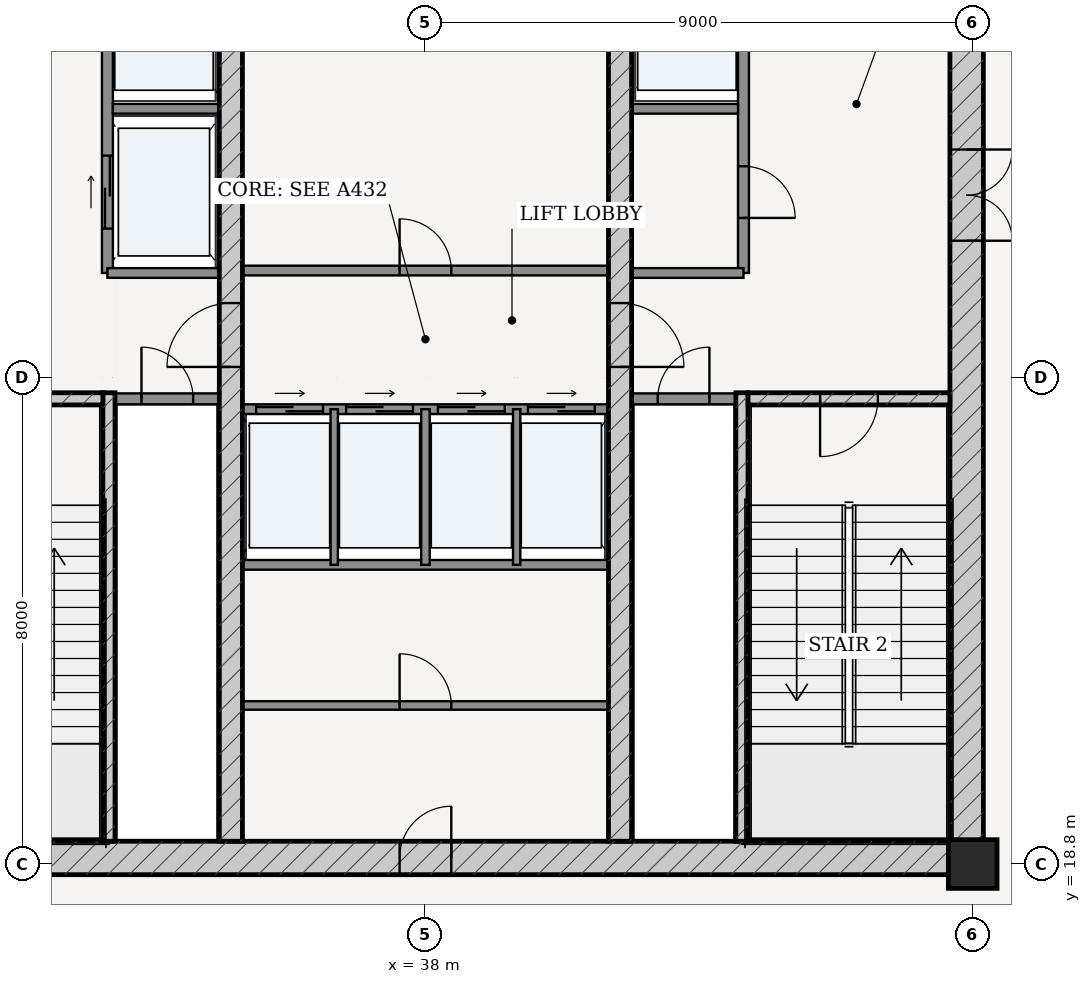
"""IFC4 building model, lengths in metres.
Left out: names, types, materials, properties, quantities, classifications, styles, units other than length and angle.
Written with IfcOpenShell. Run it as: python <this file> out.ifc"""

import sys

from ifc_helpers import new_model, si_unit, direction, frame, frame_2d, origin, origin_2d, place, context, subcontext, project, spatial, rectangle, extrude, source, transform, mapped, element, fill, save


model = new_model("IFC4")
c1 = context("Model", 3, precision=1e-05, world=origin(), true_north=direction((-0.2419218956, 0.970295726276)))
c2 = subcontext(c1, "Body", "Model", "MODEL_VIEW")
j1 = project(units=[si_unit("LENGTHUNIT", "METRE"), si_unit("PLANEANGLEUNIT", "RADIAN")], contexts=[c1])
p1 = place(None, origin())
s1 = spatial("IfcSite", under=j1, at=p1, CompositionType="ELEMENT")
p2 = place(p1, origin())
s2 = spatial("IfcBuilding", under=s1, at=p2, CompositionType="ELEMENT")
p3 = place(p2, frame((0.0, 0.0, 243.0)))
s3 = spatial("IfcBuildingStorey", under=s2, at=p3, CompositionType="ELEMENT", Elevation=243.0)
p4 = place(p3, frame((47.0, 18.8, 0.0), z_axis=(0.0, 0.0, 1.0), x_axis=(1.0, 0.0, 0.0)))
e1 = element("IfcColumn", 1, at=p4, inside=s3, PredefinedType="COLUMN", context=c2, shape_type="SweptSolid", body=[
    extrude(rectangle(XDim=0.8, YDim=0.8, at=origin_2d()), origin(), (0.0, 0.0, 1.0), 5.2),
])
p5 = place(p3, frame((28.825, 18.9, 0.0), z_axis=(0.0, 0.0, 1.0), x_axis=(1.0, 0.0, 0.0)))
e2 = element("IfcWall", 2, at=p5, inside=s3, PredefinedType="SHEAR", context=c2, shape_type="SweptSolid", body=[
    extrude(rectangle(XDim=18.35, YDim=0.55, at=frame_2d((9.175, 0.0))), origin(), (0.0, 0.0, 1.0), 4.94),
])
p6 = place(p5, frame((8.75, 0.0, 0.0)))
e3 = element("IfcOpeningElement", 3, at=p6, cuts=e2, PredefinedType="OPENING", context=c2, shape_type="SweptSolid", body=[
    extrude(rectangle(XDim=0.85, YDim=2.1, at=frame_2d((0.425, 1.05))), frame((0.0, 0.285, 0.0), z_axis=(0.0, -1.0, 0.0), x_axis=(1.0, 0.0, 0.0)), (0.0, 0.0, 1.0), 0.57),
])
p7 = place(p3, frame((46.9, 19.175, 0.0), z_axis=(0.0, 0.0, 1.0), x_axis=(0.0, 1.0, 0.0)))
e4 = element("IfcWall", 4, at=p7, inside=s3, PredefinedType="SHEAR", context=c2, shape_type="SweptSolid", body=[
    extrude(rectangle(XDim=15.25, YDim=0.55, at=frame_2d((7.625, 0.0))), origin(), (0.0, 0.0, 1.0), 4.94),
])
p8 = place(p7, frame((9.875, 0.0, 0.0)))
e5 = element("IfcOpeningElement", 5, at=p8, cuts=e4, PredefinedType="OPENING", context=c2, shape_type="SweptSolid", body=[
    extrude(rectangle(XDim=1.5, YDim=2.2, at=frame_2d((0.75, 1.1))), frame((0.0, 0.285, 0.0), z_axis=(0.0, -1.0, 0.0), x_axis=(1.0, 0.0, 0.0)), (0.0, 0.0, 1.0), 0.57),
])
p9 = place(p3, frame((32.795, 19.175, 0.0), z_axis=(0.0, 0.0, 1.0), x_axis=(0.0, 1.0, 0.0)))
e6 = element("IfcWall", 6, at=p9, inside=s3, PredefinedType="SOLIDWALL", context=c2, shape_type="SweptSolid", body=[
    extrude(rectangle(XDim=7.375, YDim=0.2, at=frame_2d((3.688, 0.0))), origin(), (0.0, 0.0, 1.0), 4.94),
])
p10 = place(p3, frame((29.375, 26.45, 0.0), z_axis=(0.0, 0.0, 1.0), x_axis=(1.0, 0.0, 0.0)))
e7 = element("IfcWall", 7, at=p10, inside=s3, PredefinedType="SOLIDWALL", context=c2, shape_type="SweptSolid", body=[
    extrude(rectangle(XDim=3.32, YDim=0.2, at=frame_2d((1.66, 0.0))), origin(), (0.0, 0.0, 1.0), 4.94),
])
p11 = place(p10, frame((1.185, 0.0, 0.0)))
e8 = element("IfcOpeningElement", 8, at=p11, cuts=e7, PredefinedType="OPENING", context=c2, shape_type="SweptSolid", body=[
    extrude(rectangle(XDim=0.95, YDim=2.15, at=frame_2d((0.475, 1.075))), frame((0.0, 0.11, 0.0), z_axis=(0.0, -1.0, 0.0), x_axis=(1.0, 0.0, 0.0)), (0.0, 0.0, 1.0), 0.22),
])
p12 = place(p3, frame((43.205, 19.175, 0.0), z_axis=(0.0, 0.0, 1.0), x_axis=(0.0, 1.0, 0.0)))
e9 = element("IfcWall", 9, at=p12, inside=s3, PredefinedType="SOLIDWALL", context=c2, shape_type="SweptSolid", body=[
    extrude(rectangle(XDim=7.375, YDim=0.2, at=frame_2d((3.688, 0.0))), origin(), (0.0, 0.0, 1.0), 4.94),
])
p13 = place(p3, frame((43.305, 26.45, 0.0), z_axis=(0.0, 0.0, 1.0), x_axis=(1.0, 0.0, 0.0)))
e10 = element("IfcWall", 10, at=p13, inside=s3, PredefinedType="SOLIDWALL", context=c2, shape_type="SweptSolid", body=[
    extrude(rectangle(XDim=3.32, YDim=0.2, at=frame_2d((1.66, 0.0))), origin(), (0.0, 0.0, 1.0), 4.94),
])
p14 = place(p13, frame((1.185, 0.0, 0.0)))
e11 = element("IfcOpeningElement", 11, at=p14, cuts=e10, PredefinedType="OPENING", context=c2, shape_type="SweptSolid", body=[
    extrude(rectangle(XDim=0.95, YDim=2.15, at=frame_2d((0.475, 1.075))), frame((0.0, 0.11, 0.0), z_axis=(0.0, -1.0, 0.0), x_axis=(1.0, 0.0, 0.0)), (0.0, 0.0, 1.0), 0.22),
])
p15 = place(p3, frame((34.8, 19.175, 0.0), z_axis=(0.0, 0.0, 1.0), x_axis=(0.0, 1.0, 0.0)))
e12 = element("IfcWall", 12, at=p15, inside=s3, PredefinedType="SHEAR", context=c2, shape_type="SweptSolid", body=[
    extrude(rectangle(XDim=15.25, YDim=0.38, at=frame_2d((7.625, 0.0))), origin(), (0.0, 0.0, 1.0), 4.94),
])
p16 = place(p15, frame((7.8, 0.0, 0.0)))
e13 = element("IfcOpeningElement", 13, at=p16, cuts=e12, PredefinedType="OPENING", context=c2, shape_type="SweptSolid", body=[
    extrude(rectangle(XDim=1.05, YDim=2.15, at=frame_2d((0.525, 1.075))), frame((0.0, 0.2, 0.0), z_axis=(0.0, -1.0, 0.0), x_axis=(1.0, 0.0, 0.0)), (0.0, 0.0, 1.0), 0.4),
])
p17 = place(p3, frame((41.2, 19.175, 0.0), z_axis=(0.0, 0.0, 1.0), x_axis=(0.0, 1.0, 0.0)))
e14 = element("IfcWall", 14, at=p17, inside=s3, PredefinedType="SHEAR", context=c2, shape_type="SweptSolid", body=[
    extrude(rectangle(XDim=15.25, YDim=0.38, at=frame_2d((7.625, 0.0))), origin(), (0.0, 0.0, 1.0), 4.94),
])
p18 = place(p17, frame((7.8, 0.0, 0.0)))
e15 = element("IfcOpeningElement", 15, at=p18, cuts=e14, PredefinedType="OPENING", context=c2, shape_type="SweptSolid", body=[
    extrude(rectangle(XDim=1.05, YDim=2.15, at=frame_2d((0.525, 1.075))), frame((0.0, 0.2, 0.0), z_axis=(0.0, -1.0, 0.0), x_axis=(1.0, 0.0, 0.0)), (0.0, 0.0, 1.0), 0.4),
])
p19 = place(p3, frame((32.9, 26.45, 0.0), z_axis=(0.0, 0.0, 1.0), x_axis=(1.0, 0.0, 0.0)))
e16 = element("IfcWall", 16, at=p19, inside=s3, PredefinedType="PARTITIONING", context=c2, shape_type="SweptSolid", body=[
    extrude(rectangle(XDim=1.71, YDim=0.18, at=frame_2d((0.855, 0.0))), origin(), (0.0, 0.0, 1.0), 4.94),
])
p20 = place(p19, frame((0.43, 0.0, 0.0)))
e17 = element("IfcOpeningElement", 17, at=p20, cuts=e16, PredefinedType="OPENING", context=c2, shape_type="SweptSolid", body=[
    extrude(rectangle(XDim=0.85, YDim=2.1, at=frame_2d((0.425, 1.05))), frame((0.0, 0.1, 0.0), z_axis=(0.0, -1.0, 0.0), x_axis=(1.0, 0.0, 0.0)), (0.0, 0.0, 1.0), 0.2),
])
p21 = place(p3, frame((41.39, 26.45, 0.0), z_axis=(0.0, 0.0, 1.0), x_axis=(1.0, 0.0, 0.0)))
e18 = element("IfcWall", 18, at=p21, inside=s3, PredefinedType="PARTITIONING", context=c2, shape_type="SweptSolid", body=[
    extrude(rectangle(XDim=1.71, YDim=0.18, at=frame_2d((0.855, 0.0))), origin(), (0.0, 0.0, 1.0), 4.94),
])
p22 = place(p21, frame((0.43, 0.0, 0.0)))
e19 = element("IfcOpeningElement", 19, at=p22, cuts=e18, PredefinedType="OPENING", context=c2, shape_type="SweptSolid", body=[
    extrude(rectangle(XDim=0.85, YDim=2.1, at=frame_2d((0.425, 1.05))), frame((0.0, 0.1, 0.0), z_axis=(0.0, -1.0, 0.0), x_axis=(1.0, 0.0, 0.0)), (0.0, 0.0, 1.0), 0.2),
])
p23 = place(p3, frame((32.77, 28.52, 0.0), z_axis=(0.0, 0.0, 1.0), x_axis=(0.0, 1.0, 0.0)))
e20 = element("IfcWall", 20, at=p23, inside=s3, PredefinedType="PARTITIONING", context=c2, shape_type="SweptSolid", body=[
    extrude(rectangle(XDim=5.905, YDim=0.18, at=frame_2d((2.953, 0.0))), origin(), (0.0, 0.0, 1.0), 4.94),
])
p24 = place(p23, frame((3.655, 0.0, 0.0)))
e21 = element("IfcOpeningElement", 21, at=p24, cuts=e20, PredefinedType="OPENING", context=c2, shape_type="SweptSolid", body=[
    extrude(rectangle(XDim=1.15, YDim=2.2, at=frame_2d((0.575, 1.1))), frame((0.0, 0.1, 0.0), z_axis=(0.0, -1.0, 0.0), x_axis=(1.0, 0.0, 0.0)), (0.0, 0.0, 1.0), 0.2),
])
p25 = place(p23, frame((0.73, 0.0, 0.0)))
e22 = element("IfcOpeningElement", 22, at=p25, cuts=e20, PredefinedType="OPENING", context=c2, shape_type="SweptSolid", body=[
    extrude(rectangle(XDim=1.2, YDim=2.25, at=frame_2d((0.6, 1.125))), frame((0.0, 0.1, 0.0), z_axis=(0.0, -1.0, 0.0), x_axis=(1.0, 0.0, 0.0)), (0.0, 0.0, 1.0), 0.2),
])
p26 = place(p3, frame((32.86, 31.22, 0.0), z_axis=(0.0, 0.0, 1.0), x_axis=(1.0, 0.0, 0.0)))
e23 = element("IfcWall", 23, at=p26, inside=s3, PredefinedType="PARTITIONING", context=c2, shape_type="SweptSolid", body=[
    extrude(rectangle(XDim=1.75, YDim=0.16, at=frame_2d((0.875, 0.0))), origin(), (0.0, 0.0, 1.0), 4.94),
])
p27 = place(p3, frame((32.77, 28.52, 0.0), z_axis=(0.0, 0.0, 1.0), x_axis=(1.0, 0.0, 0.0)))
e24 = element("IfcWall", 24, at=p27, inside=s3, PredefinedType="PARTITIONING", context=c2, shape_type="SweptSolid", body=[
    extrude(rectangle(XDim=1.84, YDim=0.16, at=frame_2d((0.92, 0.0))), origin(), (0.0, 0.0, 1.0), 4.94),
])
p28 = place(p3, frame((43.23, 28.52, 0.0), z_axis=(0.0, 0.0, 1.0), x_axis=(0.0, 1.0, 0.0)))
e25 = element("IfcWall", 25, at=p28, inside=s3, PredefinedType="PARTITIONING", context=c2, shape_type="SweptSolid", body=[
    extrude(rectangle(XDim=5.905, YDim=0.18, at=frame_2d((2.953, 0.0))), origin(), (0.0, 0.0, 1.0), 4.94),
])
p29 = place(p28, frame((0.905, 0.0, 0.0)))
e26 = element("IfcOpeningElement", 26, at=p29, cuts=e25, PredefinedType="OPENING", context=c2, shape_type="SweptSolid", body=[
    extrude(rectangle(XDim=0.85, YDim=2.1, at=frame_2d((0.425, 1.05))), frame((0.0, 0.1, 0.0), z_axis=(0.0, -1.0, 0.0), x_axis=(1.0, 0.0, 0.0)), (0.0, 0.0, 1.0), 0.2),
])
p30 = place(p28, frame((3.655, 0.0, 0.0)))
e27 = element("IfcOpeningElement", 27, at=p30, cuts=e25, PredefinedType="OPENING", context=c2, shape_type="SweptSolid", body=[
    extrude(rectangle(XDim=1.15, YDim=2.2, at=frame_2d((0.575, 1.1))), frame((0.0, 0.1, 0.0), z_axis=(0.0, -1.0, 0.0), x_axis=(1.0, 0.0, 0.0)), (0.0, 0.0, 1.0), 0.2),
])
p31 = place(p3, frame((41.39, 31.22, 0.0), z_axis=(0.0, 0.0, 1.0), x_axis=(1.0, 0.0, 0.0)))
e28 = element("IfcWall", 28, at=p31, inside=s3, PredefinedType="PARTITIONING", context=c2, shape_type="SweptSolid", body=[
    extrude(rectangle(XDim=1.75, YDim=0.16, at=frame_2d((0.875, 0.0))), origin(), (0.0, 0.0, 1.0), 4.94),
])
p32 = place(p3, frame((41.39, 28.52, 0.0), z_axis=(0.0, 0.0, 1.0), x_axis=(1.0, 0.0, 0.0)))
e29 = element("IfcWall", 29, at=p32, inside=s3, PredefinedType="PARTITIONING", context=c2, shape_type="SweptSolid", body=[
    extrude(rectangle(XDim=1.84, YDim=0.16, at=frame_2d((0.92, 0.0))), origin(), (0.0, 0.0, 1.0), 4.94),
])
p33 = place(p3, frame((34.99, 28.56, 0.0), z_axis=(0.0, 0.0, 1.0), x_axis=(1.0, 0.0, 0.0)))
e30 = element("IfcWall", 30, at=p33, inside=s3, PredefinedType="PARTITIONING", context=c2, shape_type="SweptSolid", body=[
    extrude(rectangle(XDim=6.02, YDim=0.16, at=frame_2d((3.01, 0.0))), origin(), (0.0, 0.0, 1.0), 4.94),
])
p34 = place(p33, frame((2.585, 0.0, 0.0)))
e31 = element("IfcOpeningElement", 31, at=p34, cuts=e30, PredefinedType="OPENING", context=c2, shape_type="SweptSolid", body=[
    extrude(rectangle(XDim=0.85, YDim=2.1, at=frame_2d((0.425, 1.05))), frame((0.0, 0.09, 0.0), z_axis=(0.0, -1.0, 0.0), x_axis=(1.0, 0.0, 0.0)), (0.0, 0.0, 1.0), 0.18),
])
p35 = place(p3, frame((34.99, 26.28, 0.0), z_axis=(0.0, 0.0, 1.0), x_axis=(1.0, 0.0, 0.0)))
e32 = element("IfcWall", 32, at=p35, inside=s3, PredefinedType="PARTITIONING", context=c2, shape_type="SweptSolid", body=[
    extrude(rectangle(XDim=6.02, YDim=0.16, at=frame_2d((3.01, 0.0))), origin(), (0.0, 0.0, 1.0), 4.94),
])
p36 = place(p35, frame((0.225, 0.0, 0.0)))
e33 = element("IfcOpeningElement", 33, at=p36, cuts=e32, PredefinedType="OPENING", context=c2, shape_type="SweptSolid", body=[
    extrude(rectangle(XDim=1.1, YDim=2.2, at=frame_2d((0.55, 1.1))), frame((0.0, 0.09, 0.0), z_axis=(0.0, -1.0, 0.0), x_axis=(1.0, 0.0, 0.0)), (0.0, 0.0, 1.0), 0.18),
])
p37 = place(p35, frame((1.705, 0.0, 0.0)))
e34 = element("IfcOpeningElement", 34, at=p37, cuts=e32, PredefinedType="OPENING", context=c2, shape_type="SweptSolid", body=[
    extrude(rectangle(XDim=1.1, YDim=2.2, at=frame_2d((0.55, 1.1))), frame((0.0, 0.09, 0.0), z_axis=(0.0, -1.0, 0.0), x_axis=(1.0, 0.0, 0.0)), (0.0, 0.0, 1.0), 0.18),
])
p38 = place(p35, frame((3.215, 0.0, 0.0)))
e35 = element("IfcOpeningElement", 35, at=p38, cuts=e32, PredefinedType="OPENING", context=c2, shape_type="SweptSolid", body=[
    extrude(rectangle(XDim=1.1, YDim=2.2, at=frame_2d((0.55, 1.1))), frame((0.0, 0.09, 0.0), z_axis=(0.0, -1.0, 0.0), x_axis=(1.0, 0.0, 0.0)), (0.0, 0.0, 1.0), 0.18),
])
p39 = place(p35, frame((4.695, 0.0, 0.0)))
e36 = element("IfcOpeningElement", 36, at=p39, cuts=e32, PredefinedType="OPENING", context=c2, shape_type="SweptSolid", body=[
    extrude(rectangle(XDim=1.1, YDim=2.2, at=frame_2d((0.55, 1.1))), frame((0.0, 0.09, 0.0), z_axis=(0.0, -1.0, 0.0), x_axis=(1.0, 0.0, 0.0)), (0.0, 0.0, 1.0), 0.18),
])
p40 = place(p3, frame((34.99, 23.72, 0.0), z_axis=(0.0, 0.0, 1.0), x_axis=(1.0, 0.0, 0.0)))
e37 = element("IfcWall", 37, at=p40, inside=s3, PredefinedType="PARTITIONING", context=c2, shape_type="SweptSolid", body=[
    extrude(rectangle(XDim=6.02, YDim=0.16, at=frame_2d((3.01, 0.0))), origin(), (0.0, 0.0, 1.0), 4.94),
])
p41 = place(p3, frame((36.5, 23.72, 0.0), z_axis=(0.0, 0.0, 1.0), x_axis=(0.0, 1.0, 0.0)))
e38 = element("IfcWall", 38, at=p41, inside=s3, PredefinedType="PARTITIONING", context=c2, shape_type="SweptSolid", body=[
    extrude(rectangle(XDim=2.56, YDim=0.12, at=frame_2d((1.28, 0.0))), origin(), (0.0, 0.0, 1.0), 4.94),
])
p42 = place(p3, frame((38.0, 23.72, 0.0), z_axis=(0.0, 0.0, 1.0), x_axis=(0.0, 1.0, 0.0)))
e39 = element("IfcWall", 39, at=p42, inside=s3, PredefinedType="PARTITIONING", context=c2, shape_type="SweptSolid", body=[
    extrude(rectangle(XDim=2.56, YDim=0.14, at=frame_2d((1.28, 0.0))), origin(), (0.0, 0.0, 1.0), 4.94),
])
p43 = place(p3, frame((39.5, 23.72, 0.0), z_axis=(0.0, 0.0, 1.0), x_axis=(0.0, 1.0, 0.0)))
e40 = element("IfcWall", 40, at=p43, inside=s3, PredefinedType="PARTITIONING", context=c2, shape_type="SweptSolid", body=[
    extrude(rectangle(XDim=2.56, YDim=0.12, at=frame_2d((1.28, 0.0))), origin(), (0.0, 0.0, 1.0), 4.94),
])
p44 = place(p3, frame((34.99, 21.407, 0.0), z_axis=(0.0, 0.0, 1.0), x_axis=(1.0, 0.0, 0.0)))
e41 = element("IfcWall", 41, at=p44, inside=s3, PredefinedType="PARTITIONING", context=c2, shape_type="SweptSolid", body=[
    extrude(rectangle(XDim=6.02, YDim=0.14, at=frame_2d((3.01, 0.0))), origin(), (0.0, 0.0, 1.0), 4.94),
])
p45 = place(p44, frame((2.585, 0.0, 0.0)))
e42 = element("IfcOpeningElement", 42, at=p45, cuts=e41, PredefinedType="OPENING", context=c2, shape_type="SweptSolid", body=[
    extrude(rectangle(XDim=0.85, YDim=2.1, at=frame_2d((0.425, 1.05))), frame((0.0, 0.08, 0.0), z_axis=(0.0, -1.0, 0.0), x_axis=(1.0, 0.0, 0.0)), (0.0, 0.0, 1.0), 0.16),
])
m1 = source(origin(), c2, "Body", "SweptSolid", [
    extrude(rectangle(XDim=1.5, YDim=2.2, at=frame_2d((0.75, 1.1))), frame((0.0, 0.025, 0.0), z_axis=(0.0, -1.0, 0.0), x_axis=(1.0, 0.0, 0.0)), (0.0, 0.0, 1.0), 0.05),
])
p46 = place(p8, frame((1.5, 0.0, 0.0), z_axis=(0.0, 0.0, 1.0), x_axis=(-1.0, 0.0, 0.0)))
e43 = element("IfcDoor", 43, at=p46, inside=s3, OperationType="DOUBLE_DOOR_SINGLE_SWING", PredefinedType="DOOR", context=c2, shape_type="MappedRepresentation", body=[
    mapped(m1, transform((0.0, 0.0, 0.0), scale=1.0)),
])
fill(e5, e43)
m2 = source(origin(), c2, "Body", "SweptSolid", [
    extrude(rectangle(XDim=1.05, YDim=2.15, at=frame_2d((0.525, 1.075))), frame((0.0, 0.025, 0.0), z_axis=(0.0, -1.0, 0.0), x_axis=(1.0, 0.0, 0.0)), (0.0, 0.0, 1.0), 0.05),
])
p47 = place(p16, origin())
e44 = element("IfcDoor", 44, at=p47, inside=s3, OperationType="SINGLE_SWING_LEFT", PredefinedType="DOOR", context=c2, shape_type="MappedRepresentation", body=[
    mapped(m2, transform((0.0, 0.0, 0.0), scale=1.0)),
])
fill(e13, e44)
p48 = place(p18, frame((1.05, 0.0, 0.0), z_axis=(0.0, 0.0, 1.0), x_axis=(-1.0, 0.0, 0.0)))
e45 = element("IfcDoor", 45, at=p48, inside=s3, OperationType="SINGLE_SWING_RIGHT", PredefinedType="DOOR", context=c2, shape_type="MappedRepresentation", body=[
    mapped(m2, transform((0.0, 0.0, 0.0), scale=1.0)),
])
fill(e15, e45)
m3 = source(origin(), c2, "Body", "SweptSolid", [
    extrude(rectangle(XDim=0.95, YDim=2.15, at=frame_2d((0.475, 1.075))), frame((0.0, 0.025, 0.0), z_axis=(0.0, -1.0, 0.0), x_axis=(1.0, 0.0, 0.0)), (0.0, 0.0, 1.0), 0.05),
])
p49 = place(p14, frame((0.95, 0.0, 0.0), z_axis=(0.0, 0.0, 1.0), x_axis=(-1.0, 0.0, 0.0)))
e46 = element("IfcDoor", 46, at=p49, inside=s3, OperationType="SINGLE_SWING_RIGHT", PredefinedType="DOOR", context=c2, shape_type="MappedRepresentation", body=[
    mapped(m3, transform((0.0, 0.0, 0.0), scale=1.0)),
])
fill(e11, e46)
m4 = source(origin(), c2, "Body", "SweptSolid", [
    extrude(rectangle(XDim=0.85, YDim=2.1, at=frame_2d((0.425, 1.05))), frame((0.0, 0.025, 0.0), z_axis=(0.0, -1.0, 0.0), x_axis=(1.0, 0.0, 0.0)), (0.0, 0.0, 1.0), 0.05),
])
p50 = place(p20, origin())
e47 = element("IfcDoor", 47, at=p50, inside=s3, OperationType="SINGLE_SWING_LEFT", PredefinedType="DOOR", context=c2, shape_type="MappedRepresentation", body=[
    mapped(m4, transform((0.0, 0.0, 0.0), scale=1.0)),
])
fill(e17, e47)
p51 = place(p22, origin())
e48 = element("IfcDoor", 48, at=p51, inside=s3, OperationType="SINGLE_SWING_RIGHT", PredefinedType="DOOR", context=c2, shape_type="MappedRepresentation", body=[
    mapped(m4, transform((0.0, 0.0, 0.0), scale=1.0)),
])
fill(e19, e48)
p52 = place(p29, frame((0.85, 0.0, 0.0), z_axis=(0.0, 0.0, 1.0), x_axis=(-1.0, 0.0, 0.0)))
e49 = element("IfcDoor", 49, at=p52, inside=s3, OperationType="SINGLE_SWING_RIGHT", PredefinedType="DOOR", context=c2, shape_type="MappedRepresentation", body=[
    mapped(m4, transform((0.0, 0.0, 0.0), scale=1.0)),
])
fill(e26, e49)
p53 = place(p34, origin())
e50 = element("IfcDoor", 50, at=p53, inside=s3, OperationType="SINGLE_SWING_LEFT", PredefinedType="DOOR", context=c2, shape_type="MappedRepresentation", body=[
    mapped(m4, transform((0.0, 0.0, 0.0), scale=1.0)),
])
fill(e31, e50)
p54 = place(p6, origin())
e51 = element("IfcDoor", 51, at=p54, inside=s3, OperationType="SINGLE_SWING_RIGHT", PredefinedType="DOOR", context=c2, shape_type="MappedRepresentation", body=[
    mapped(m4, transform((0.0, 0.0, 0.0), scale=1.0)),
])
fill(e3, e51)
p55 = place(p45, origin())
e52 = element("IfcDoor", 52, at=p55, inside=s3, OperationType="SINGLE_SWING_LEFT", PredefinedType="DOOR", context=c2, shape_type="MappedRepresentation", body=[
    mapped(m4, transform((0.0, 0.0, 0.0), scale=1.0)),
])
fill(e42, e52)
m5 = source(origin(), c2, "Body", "SweptSolid", [
    extrude(rectangle(XDim=1.2, YDim=2.25, at=frame_2d((0.6, 1.125))), frame((0.0, 0.025, 0.0), z_axis=(0.0, -1.0, 0.0), x_axis=(1.0, 0.0, 0.0)), (0.0, 0.0, 1.0), 0.05),
])
p56 = place(p25, origin())
e53 = element("IfcDoor", 53, at=p56, inside=s3, OperationType="DOUBLE_DOOR_SLIDING", PredefinedType="DOOR", context=c2, shape_type="MappedRepresentation", body=[
    mapped(m5, transform((0.0, 0.0, 0.0), scale=1.0)),
])
fill(e22, e53)
m6 = source(origin(), c2, "Body", "SweptSolid", [
    extrude(rectangle(XDim=1.1, YDim=2.2, at=frame_2d((0.55, 1.1))), frame((0.0, 0.025, 0.0), z_axis=(0.0, -1.0, 0.0), x_axis=(1.0, 0.0, 0.0)), (0.0, 0.0, 1.0), 0.05),
])
p57 = place(p36, origin())
e54 = element("IfcDoor", 54, at=p57, inside=s3, OperationType="DOUBLE_DOOR_SLIDING", PredefinedType="DOOR", context=c2, shape_type="MappedRepresentation", body=[
    mapped(m6, transform((0.0, 0.0, 0.0), scale=1.0)),
])
fill(e33, e54)
p58 = place(p37, origin())
e55 = element("IfcDoor", 55, at=p58, inside=s3, OperationType="DOUBLE_DOOR_SLIDING", PredefinedType="DOOR", context=c2, shape_type="MappedRepresentation", body=[
    mapped(m6, transform((0.0, 0.0, 0.0), scale=1.0)),
])
fill(e34, e55)
p59 = place(p38, origin())
e56 = element("IfcDoor", 56, at=p59, inside=s3, OperationType="DOUBLE_DOOR_SLIDING", PredefinedType="DOOR", context=c2, shape_type="MappedRepresentation", body=[
    mapped(m6, transform((0.0, 0.0, 0.0), scale=1.0)),
])
fill(e35, e56)
p60 = place(p39, origin())
e57 = element("IfcDoor", 57, at=p60, inside=s3, OperationType="DOUBLE_DOOR_SLIDING", PredefinedType="DOOR", context=c2, shape_type="MappedRepresentation", body=[
    mapped(m6, transform((0.0, 0.0, 0.0), scale=1.0)),
])
fill(e36, e57)
save(model, sys.argv[1])
